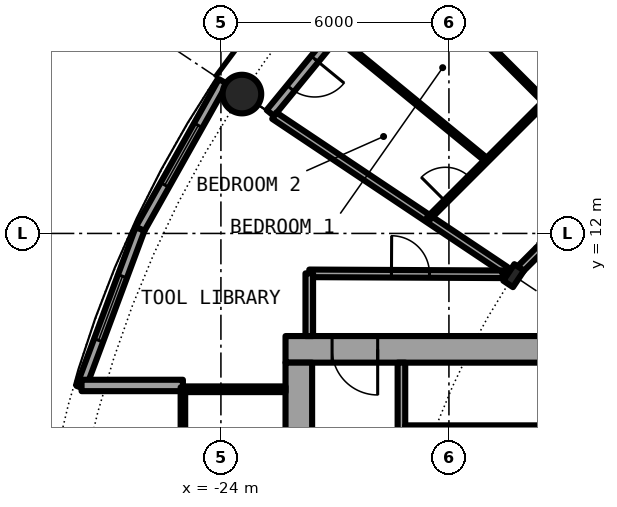
"""IFC4 building model, lengths in metres.
Left out: names, types, materials, properties, quantities, classifications, styles, units other than length and angle.
Written with IfcOpenShell. Run it as: python <this file> out.ifc"""

import sys

from ifc_helpers import new_model, si_unit, direction, frame, frame_2d, origin, origin_2d, place, context, subcontext, project, spatial, rectangle, hollow_circle, i_section, extrude, element, fill, save


model = new_model("IFC4")
c1 = context("Model", 3, precision=1e-05, world=origin(), true_north=direction((0.0, 1.0)))
c2 = subcontext(c1, "Body", "Model", "MODEL_VIEW")
j1 = project(units=[si_unit("LENGTHUNIT", "METRE"), si_unit("PLANEANGLEUNIT", "RADIAN")], contexts=[c1])
p1 = place(None, origin())
s1 = spatial("IfcSite", under=j1, at=p1, CompositionType="ELEMENT")
p2 = place(p1, origin())
s2 = spatial("IfcBuilding", under=s1, at=p2, CompositionType="ELEMENT")
p3 = place(p2, frame((0.0, 0.0, 72.75)))
s3 = spatial("IfcBuildingStorey", under=s2, at=p3, CompositionType="ELEMENT", Elevation=72.75)
p4 = place(p3, frame((-23.448, 15.667, 0.0), z_axis=(0.0, 0.0, 1.0), x_axis=(1.0, 0.0, 0.0)))
e1 = element("IfcColumn", 1, at=p4, inside=s3, PredefinedType="COLUMN", context=c2, shape_type="SweptSolid", body=[
    extrude(hollow_circle(Radius=0.508, WallThickness=0.04, at=origin_2d()), origin(), (0.0, 0.0, 1.0), 3.05),
])
p5 = place(p3, frame((-16.297, 10.889, 0.0), z_axis=(0.0, 0.0, 1.0), x_axis=(-0.831469612303, 0.55557023302, 0.0)))
e2 = element("IfcColumn", 2, at=p5, inside=s3, PredefinedType="COLUMN", context=c2, shape_type="SweptSolid", body=[
    extrude(i_section(OverallWidth=0.306, OverallDepth=0.524, WebThickness=0.021, FlangeThickness=0.04, FilletRadius=0.027, at=origin_2d()), origin(), (0.0, 0.0, 1.0), 3.05),
])
p6 = place(p3, frame((-19.304, 19.304, 0.0), z_axis=(0.0, 0.0, 1.0), x_axis=(-0.634382322723, -0.773019449054, 0.0)))
e3 = element("IfcWall", 3, at=p6, inside=s3, PredefinedType="SOLIDWALL", context=c2, shape_type="SweptSolid", body=[
    extrude(rectangle(XDim=5.352, YDim=0.25, at=frame_2d((2.676, 0.0))), origin(), (0.0, 0.0, 1.0), 2.7),
])
p7 = place(p6, frame((0.441, 0.0, 0.3)))
e4 = element("IfcOpeningElement", 4, at=p7, cuts=e3, PredefinedType="OPENING", context=c2, shape_type="SweptSolid", body=[
    extrude(rectangle(XDim=1.8, YDim=2.1, at=frame_2d((0.9, 1.05))), frame((0.0, 0.135, 0.0), z_axis=(0.0, -1.0, 0.0), x_axis=(1.0, 0.0, 0.0)), (0.0, 0.0, 1.0), 0.27),
])
p8 = place(p6, frame((3.51, 0.0, 0.0)))
e5 = element("IfcOpeningElement", 5, at=p8, cuts=e3, PredefinedType="OPENING", context=c2, shape_type="SweptSolid", body=[
    extrude(rectangle(XDim=1.0, YDim=2.2, at=frame_2d((0.5, 1.1))), frame((0.0, 0.135, 0.0), z_axis=(0.0, -1.0, 0.0), x_axis=(1.0, 0.0, 0.0)), (0.0, 0.0, 1.0), 0.27),
])
p9 = place(p3, frame((-23.946, 16.0, 0.0), z_axis=(0.0, 0.0, 1.0), x_axis=(-0.489696356642, -0.871893042919, 0.0)))
e6 = element("IfcWall", 6, at=p9, inside=s3, PredefinedType="SOLIDWALL", context=c2, shape_type="SweptSolid", body=[
    extrude(rectangle(XDim=4.454, YDim=0.25, at=frame_2d((2.227, 0.0))), origin(), (0.0, 0.0, 1.0), 2.7),
])
p10 = place(p9, frame((1.327, 0.0, 0.3)))
e7 = element("IfcOpeningElement", 7, at=p10, cuts=e6, PredefinedType="OPENING", context=c2, shape_type="SweptSolid", body=[
    extrude(rectangle(XDim=1.8, YDim=2.1, at=frame_2d((0.9, 1.05))), frame((0.0, 0.135, 0.0), z_axis=(0.0, -1.0, 0.0), x_axis=(1.0, 0.0, 0.0)), (0.0, 0.0, 1.0), 0.27),
])
p11 = place(p3, frame((-26.127, 12.117, 0.0), z_axis=(0.0, 0.0, 1.0), x_axis=(-0.349247811493, -0.937030397675, 0.0)))
e8 = element("IfcWall", 8, at=p11, inside=s3, PredefinedType="SOLIDWALL", context=c2, shape_type="SweptSolid", body=[
    extrude(rectangle(XDim=4.452, YDim=0.25, at=frame_2d((2.226, 0.0))), origin(), (0.0, 0.0, 1.0), 2.7),
])
p12 = place(p11, frame((1.327, 0.0, 0.3)))
e9 = element("IfcOpeningElement", 9, at=p12, cuts=e8, PredefinedType="OPENING", context=c2, shape_type="SweptSolid", body=[
    extrude(rectangle(XDim=1.8, YDim=2.1, at=frame_2d((0.9, 1.05))), frame((0.0, 0.135, 0.0), z_axis=(0.0, -1.0, 0.0), x_axis=(1.0, 0.0, 0.0)), (0.0, 0.0, 1.0), 0.27),
])
p13 = place(p3, frame((-25.0, 8.0, 0.0), z_axis=(0.0, 0.0, 1.0), x_axis=(-1.0, 0.0, 0.0)))
e10 = element("IfcWall", 10, at=p13, inside=s3, PredefinedType="SOLIDWALL", context=c2, shape_type="SweptSolid", body=[
    extrude(rectangle(XDim=2.667, YDim=0.3, at=frame_2d((1.333, 0.0))), origin(), (0.0, 0.0, 1.0), 2.7),
])
p14 = place(p3, frame((-8.3, 8.95, 0.0), z_axis=(0.0, 0.0, 1.0), x_axis=(-1.0, 0.0, 0.0)))
e11 = element("IfcWall", 11, at=p14, inside=s3, PredefinedType="SHEAR", context=c2, shape_type="SweptSolid", body=[
    extrude(rectangle(XDim=14.0, YDim=0.7, at=frame_2d((7.0, 0.0))), origin(), (0.0, 0.0, 1.0), 3.05),
])
p15 = place(p14, frame((11.575, 0.0, 0.0)))
e12 = element("IfcOpeningElement", 12, at=p15, cuts=e11, PredefinedType="OPENING", context=c2, shape_type="SweptSolid", body=[
    extrude(rectangle(XDim=1.2, YDim=2.3, at=frame_2d((0.6, 1.15))), frame((0.0, 0.36, 0.0), z_axis=(0.0, -1.0, 0.0), x_axis=(1.0, 0.0, 0.0)), (0.0, 0.0, 1.0), 0.72),
])
p16 = place(p3, frame((-21.95, -8.6, 0.0), z_axis=(0.0, 0.0, 1.0), x_axis=(0.0, 1.0, 0.0)))
e13 = element("IfcWall", 13, at=p16, inside=s3, PredefinedType="SHEAR", context=c2, shape_type="SweptSolid", body=[
    extrude(rectangle(XDim=17.2, YDim=0.7, at=frame_2d((8.6, 0.0))), origin(), (0.0, 0.0, 1.0), 3.05),
])
p17 = place(p16, frame((7.7, 0.0, 0.0)))
e14 = element("IfcOpeningElement", 14, at=p17, cuts=e13, PredefinedType="OPENING", context=c2, shape_type="SweptSolid", body=[
    extrude(rectangle(XDim=1.8, YDim=2.3, at=frame_2d((0.9, 1.15))), frame((0.0, 0.36, 0.0), z_axis=(0.0, -1.0, 0.0), x_axis=(1.0, 0.0, 0.0)), (0.0, 0.0, 1.0), 0.72),
])
p18 = place(p3, frame((-19.25, 8.6, 0.0), z_axis=(0.0, 0.0, 1.0), x_axis=(0.0, -1.0, 0.0)))
e15 = element("IfcWall", 15, at=p18, inside=s3, PredefinedType="SOLIDWALL", context=c2, shape_type="SweptSolid", body=[
    extrude(rectangle(XDim=7.025, YDim=0.2, at=frame_2d((3.513, 0.0))), origin(), (0.0, 0.0, 1.0), 2.7),
])
p19 = place(p18, frame((2.35, 0.0, 0.0)))
e16 = element("IfcOpeningElement", 16, at=p19, cuts=e15, PredefinedType="OPENING", context=c2, shape_type="SweptSolid", body=[
    extrude(rectangle(XDim=1.1, YDim=2.3, at=frame_2d((0.55, 1.15))), frame((0.0, 0.11, 0.0), z_axis=(0.0, -1.0, 0.0), x_axis=(1.0, 0.0, 0.0)), (0.0, 0.0, 1.0), 0.22),
])
p20 = place(p3, frame((-15.45, 6.875, 0.0), z_axis=(0.0, 0.0, 1.0), x_axis=(-1.0, 0.0, 0.0)))
e17 = element("IfcWall", 17, at=p20, inside=s3, PredefinedType="PARTITIONING", context=c2, shape_type="SweptSolid", body=[
    extrude(rectangle(XDim=3.7, YDim=0.15, at=frame_2d((1.85, 0.0))), origin(), (0.0, 0.0, 1.0), 2.7),
])
p21 = place(p20, frame((1.4, 0.0, 0.0)))
e18 = element("IfcOpeningElement", 18, at=p21, cuts=e17, PredefinedType="OPENING", context=c2, shape_type="SweptSolid", body=[
    extrude(rectangle(XDim=0.9, YDim=2.3, at=frame_2d((0.45, 1.15))), frame((0.0, 0.085, 0.0), z_axis=(0.0, -1.0, 0.0), x_axis=(1.0, 0.0, 0.0)), (0.0, 0.0, 1.0), 0.17),
])
p22 = place(p3, frame((-22.3, 7.9, 0.0), z_axis=(0.0, 0.0, 1.0), x_axis=(-1.0, 0.0, 0.0)))
e19 = element("IfcWall", 19, at=p22, inside=s3, PredefinedType="PARTITIONING", context=c2, shape_type="SweptSolid", body=[
    extrude(rectangle(XDim=2.64, YDim=0.15, at=frame_2d((1.32, 0.0))), origin(), (0.0, 0.0, 1.0), 2.7),
])
p23 = place(p3, frame((-25.0, 7.95, 0.0), z_axis=(0.0, 0.0, 1.0), x_axis=(0.0, -1.0, 0.0)))
e20 = element("IfcWall", 20, at=p23, inside=s3, PredefinedType="PARTITIONING", context=c2, shape_type="SweptSolid", body=[
    extrude(rectangle(XDim=15.9, YDim=0.12, at=frame_2d((7.95, 0.0))), origin(), (0.0, 0.0, 1.0), 2.7),
])
p24 = place(p23, frame((0.95, 0.0, 0.1)))
e21 = element("IfcOpeningElement", 21, at=p24, cuts=e20, PredefinedType="OPENING", context=c2, shape_type="SweptSolid", body=[
    extrude(rectangle(XDim=14.0, YDim=2.35, at=frame_2d((7.0, 1.175))), frame((0.0, 0.07, 0.0), z_axis=(0.0, -1.0, 0.0), x_axis=(1.0, 0.0, 0.0)), (0.0, 0.0, 1.0), 0.14),
])
p25 = place(p3, frame((-22.595, 15.098, 0.0), z_axis=(0.0, 0.0, 1.0), x_axis=(0.831382022135, -0.555701298605, 0.0)))
e22 = element("IfcWall", 22, at=p25, inside=s3, PredefinedType="PARTITIONING", context=c2, shape_type="SweptSolid", body=[
    extrude(rectangle(XDim=7.313, YDim=0.2, at=frame_2d((3.657, 0.0))), origin(), (0.0, 0.0, 1.0), 2.7),
])
p26 = place(p3, frame((-21.023, 17.22, 0.0), z_axis=(0.0, 0.0, 1.0), x_axis=(0.773517471898, -0.633774976367, 0.0)))
e23 = element("IfcWall", 23, at=p26, inside=s3, PredefinedType="PARTITIONING", context=c2, shape_type="SweptSolid", body=[
    extrude(rectangle(XDim=5.196, YDim=0.1, at=frame_2d((2.598, 0.0))), origin(), (0.0, 0.0, 1.0), 2.7),
])
p27 = place(p3, frame((-19.216, 19.216, 0.0), z_axis=(0.0, 0.0, 1.0), x_axis=(0.707106781187, -0.707106781187, 0.0)))
e24 = element("IfcWall", 24, at=p27, inside=s3, PredefinedType="PARTITIONING", context=c2, shape_type="SweptSolid", body=[
    extrude(rectangle(XDim=5.305, YDim=0.1, at=frame_2d((2.652, 0.0))), origin(), (0.0, 0.0, 1.0), 2.7),
])
p28 = place(p27, frame((2.202, 0.0, 0.0)))
e25 = element("IfcOpeningElement", 25, at=p28, cuts=e24, PredefinedType="OPENING", context=c2, shape_type="SweptSolid", body=[
    extrude(rectangle(XDim=0.9, YDim=2.3, at=frame_2d((0.45, 1.15))), frame((0.0, 0.06, 0.0), z_axis=(0.0, -1.0, 0.0), x_axis=(1.0, 0.0, 0.0)), (0.0, 0.0, 1.0), 0.12),
])
p29 = place(p3, frame((-21.675, 10.95, 0.0), z_axis=(0.0, 0.0, 1.0), x_axis=(0.999988019025, -0.004895079807, 0.0)))
e26 = element("IfcWall", 26, at=p29, inside=s3, PredefinedType="PARTITIONING", context=c2, shape_type="SweptSolid", body=[
    extrude(rectangle(XDim=5.087, YDim=0.2, at=frame_2d((2.543, 0.0))), origin(), (0.0, 0.0, 1.0), 2.7),
])
p30 = place(p29, frame((2.163, 0.0, 0.0)))
e27 = element("IfcOpeningElement", 27, at=p30, cuts=e26, PredefinedType="OPENING", context=c2, shape_type="SweptSolid", body=[
    extrude(rectangle(XDim=1.0, YDim=2.3, at=frame_2d((0.5, 1.15))), frame((0.0, 0.11, 0.0), z_axis=(0.0, -1.0, 0.0), x_axis=(1.0, 0.0, 0.0)), (0.0, 0.0, 1.0), 0.22),
])
p31 = place(p3, frame((-16.186, 11.0, 0.0), z_axis=(0.0, 0.0, 1.0), x_axis=(0.707106781187, 0.707106781187, 0.0)))
e28 = element("IfcWall", 28, at=p31, inside=s3, PredefinedType="PARTITIONING", context=c2, shape_type="SweptSolid", body=[
    extrude(rectangle(XDim=7.334, YDim=0.2, at=frame_2d((3.667, 0.0))), origin(), (0.0, 0.0, 1.0), 2.38),
])
p32 = place(p31, frame((2.211, 0.0, 0.0)))
e29 = element("IfcOpeningElement", 29, at=p32, cuts=e28, PredefinedType="OPENING", context=c2, shape_type="SweptSolid", body=[
    extrude(rectangle(XDim=1.0, YDim=2.3, at=frame_2d((0.5, 1.15))), frame((0.0, 0.11, 0.0), z_axis=(0.0, -1.0, 0.0), x_axis=(1.0, 0.0, 0.0)), (0.0, 0.0, 1.0), 0.22),
])
p33 = place(p3, frame((-21.675, 9.3, 0.0), z_axis=(0.0, 0.0, 1.0), x_axis=(0.0, 1.0, 0.0)))
e30 = element("IfcWall", 30, at=p33, inside=s3, PredefinedType="PARTITIONING", context=c2, shape_type="SweptSolid", body=[
    extrude(rectangle(XDim=1.65, YDim=0.2, at=frame_2d((0.825, 0.0))), origin(), (0.0, 0.0, 1.0), 2.7),
])
p34 = place(p3, frame((-18.542, 12.389, 0.0), z_axis=(0.0, 0.0, 1.0), x_axis=(0.707190945535, 0.707022606819, 0.0)))
e31 = element("IfcWall", 31, at=p34, inside=s3, PredefinedType="PARTITIONING", context=c2, shape_type="SweptSolid", body=[
    extrude(rectangle(XDim=4.351, YDim=0.1, at=frame_2d((2.175, 0.0))), origin(), (0.0, 0.0, 1.0), 2.7),
])
p35 = place(p34, frame((0.639, 0.0, 0.0)))
e32 = element("IfcOpeningElement", 32, at=p35, cuts=e31, PredefinedType="OPENING", context=c2, shape_type="SweptSolid", body=[
    extrude(rectangle(XDim=0.9, YDim=2.3, at=frame_2d((0.45, 1.15))), frame((0.0, 0.06, 0.0), z_axis=(0.0, -1.0, 0.0), x_axis=(1.0, 0.0, 0.0)), (0.0, 0.0, 1.0), 0.12),
])
p36 = place(p8, origin())
e33 = element("IfcDoor", 33, at=p36, inside=s3, OperationType="SINGLE_SWING_LEFT", PredefinedType="DOOR", context=c2, shape_type="SweptSolid", body=[
    extrude(rectangle(XDim=1.0, YDim=2.2, at=frame_2d((0.5, 1.1))), frame((0.0, 0.025, 0.0), z_axis=(0.0, -1.0, 0.0), x_axis=(1.0, 0.0, 0.0)), (0.0, 0.0, 1.0), 0.05),
])
fill(e5, e33)
p37 = place(p10, origin())
e34 = element("IfcWindow", 34, at=p37, inside=s3, PartitioningType="SINGLE_PANEL", PredefinedType="WINDOW", context=c2, shape_type="SweptSolid", body=[
    extrude(rectangle(XDim=1.8, YDim=2.1, at=frame_2d((0.9, 1.05))), frame((0.0, 0.03, 0.0), z_axis=(0.0, -1.0, 0.0), x_axis=(1.0, 0.0, 0.0)), (0.0, 0.0, 1.0), 0.06),
])
fill(e7, e34)
p38 = place(p12, origin())
e35 = element("IfcWindow", 35, at=p38, inside=s3, PartitioningType="SINGLE_PANEL", PredefinedType="WINDOW", context=c2, shape_type="SweptSolid", body=[
    extrude(rectangle(XDim=1.8, YDim=2.1, at=frame_2d((0.9, 1.05))), frame((0.0, 0.03, 0.0), z_axis=(0.0, -1.0, 0.0), x_axis=(1.0, 0.0, 0.0)), (0.0, 0.0, 1.0), 0.06),
])
fill(e9, e35)
p39 = place(p21, origin())
e36 = element("IfcDoor", 36, at=p39, inside=s3, OperationType="SINGLE_SWING_LEFT", PredefinedType="DOOR", context=c2, shape_type="SweptSolid", body=[
    extrude(rectangle(XDim=0.9, YDim=2.3, at=frame_2d((0.45, 1.15))), frame((0.0, 0.025, 0.0), z_axis=(0.0, -1.0, 0.0), x_axis=(1.0, 0.0, 0.0)), (0.0, 0.0, 1.0), 0.05),
])
fill(e18, e36)
p40 = place(p15, origin())
e37 = element("IfcDoor", 37, at=p40, inside=s3, OperationType="SINGLE_SWING_LEFT", PredefinedType="DOOR", context=c2, shape_type="SweptSolid", body=[
    extrude(rectangle(XDim=1.2, YDim=2.3, at=frame_2d((0.6, 1.15))), frame((0.0, 0.025, 0.0), z_axis=(0.0, -1.0, 0.0), x_axis=(1.0, 0.0, 0.0)), (0.0, 0.0, 1.0), 0.05),
])
fill(e12, e37)
p41 = place(p24, origin())
e38 = element("IfcWindow", 38, at=p41, inside=s3, PartitioningType="SINGLE_PANEL", PredefinedType="WINDOW", context=c2, shape_type="SweptSolid", body=[
    extrude(rectangle(XDim=14.0, YDim=2.35, at=frame_2d((7.0, 1.175))), frame((0.0, 0.03, 0.0), z_axis=(0.0, -1.0, 0.0), x_axis=(1.0, 0.0, 0.0)), (0.0, 0.0, 1.0), 0.06),
])
fill(e21, e38)
p42 = place(p35, origin())
e39 = element("IfcDoor", 39, at=p42, inside=s3, OperationType="SINGLE_SWING_LEFT", PredefinedType="DOOR", context=c2, shape_type="SweptSolid", body=[
    extrude(rectangle(XDim=0.9, YDim=2.3, at=frame_2d((0.45, 1.15))), frame((0.0, 0.025, 0.0), z_axis=(0.0, -1.0, 0.0), x_axis=(1.0, 0.0, 0.0)), (0.0, 0.0, 1.0), 0.05),
])
fill(e32, e39)
p43 = place(p30, origin())
e40 = element("IfcDoor", 40, at=p43, inside=s3, OperationType="SINGLE_SWING_RIGHT", PredefinedType="DOOR", context=c2, shape_type="SweptSolid", body=[
    extrude(rectangle(XDim=1.0, YDim=2.3, at=frame_2d((0.5, 1.15))), frame((0.0, 0.025, 0.0), z_axis=(0.0, -1.0, 0.0), x_axis=(1.0, 0.0, 0.0)), (0.0, 0.0, 1.0), 0.05),
])
fill(e27, e40)
save(model, sys.argv[1])
